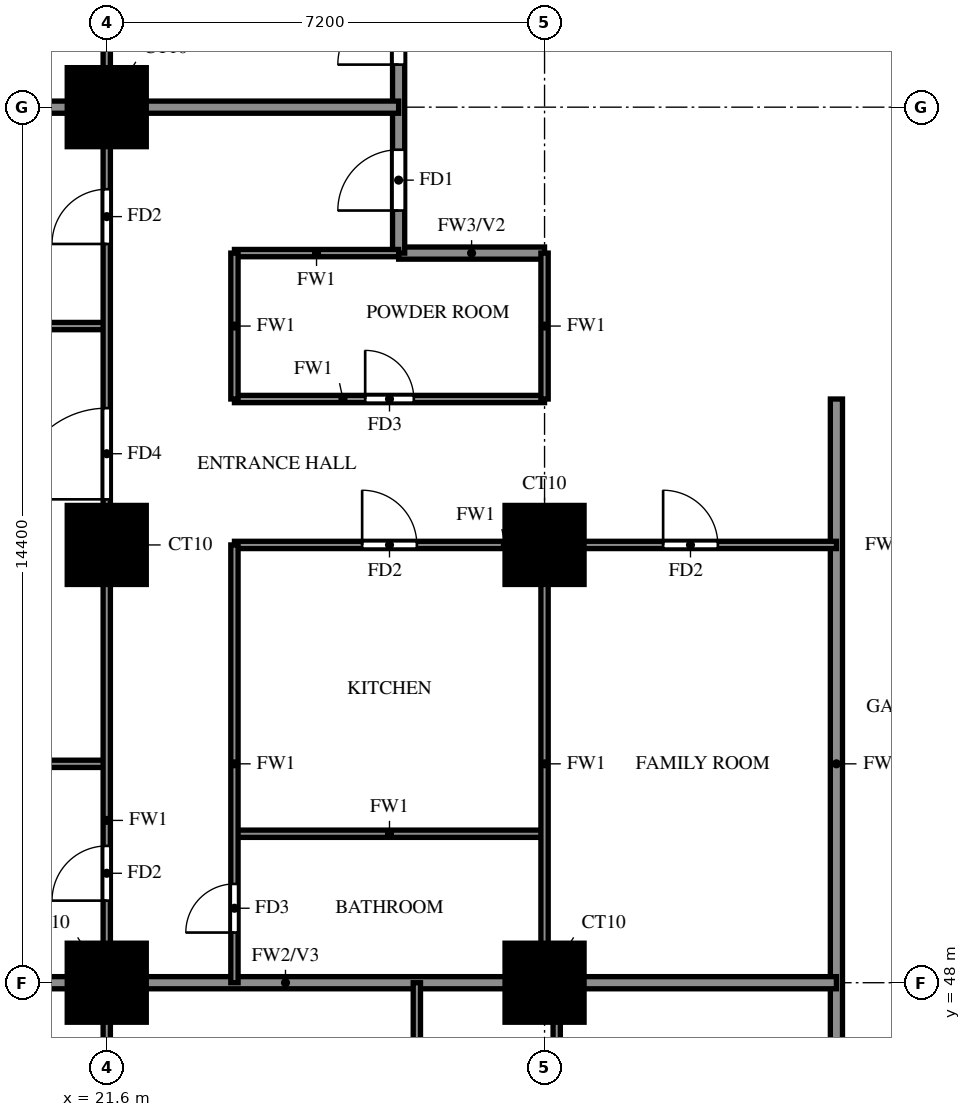
"""IFC4 building model, lengths in metres.
Left out: names, types, materials, properties, quantities, classifications, styles, units other than length and angle.
Written with IfcOpenShell. Run it as: python <this file> out.ifc"""

import sys

from ifc_helpers import new_model, si_unit, direction, frame, frame_2d, origin, origin_2d, place, context, subcontext, project, spatial, rectangle, extrude, source, transform, mapped, element, fill, save


model = new_model("IFC4")
c1 = context("Model", 3, precision=1e-05, world=origin(), true_north=direction((0.0, 1.0)))
c2 = subcontext(c1, "Body", "Model", "MODEL_VIEW")
j1 = project(units=[si_unit("LENGTHUNIT", "METRE"), si_unit("PLANEANGLEUNIT", "RADIAN")], contexts=[c1])
p1 = place(None, origin())
s1 = spatial("IfcSite", under=j1, at=p1, CompositionType="ELEMENT")
p2 = place(p1, origin())
s2 = spatial("IfcBuilding", under=s1, at=p2, CompositionType="ELEMENT")
p3 = place(p2, frame((0.0, 0.0, 86.5)))
s3 = spatial("IfcBuildingStorey", under=s2, at=p3, CompositionType="ELEMENT", Elevation=86.5)
m1 = source(origin(), c2, "Body", "SweptSolid", [
    extrude(rectangle(XDim=1.3, YDim=1.3, at=origin_2d()), origin(), (0.0, 0.0, 1.0), 3.18),
])
for number, where, z_axis, x_axis in (
    (1, (21.6, 48.0, 0.0), (0.0, 0.0, 1.0), (1.0, 0.0, 0.0)),
    (2, (28.8, 48.0, 0.0), (0.0, 0.0, 1.0), (1.0, 0.0, 0.0)),
    (3, (21.6, 55.2, 0.0), (0.0, 0.0, 1.0), (1.0, 0.0, 0.0)),
    (4, (28.8, 55.2, 0.0), (0.0, 0.0, 1.0), (1.0, 0.0, 0.0)),
    (5, (21.6, 62.4, 0.0), (0.0, 0.0, 1.0), (1.0, 0.0, 0.0)),
):
    element("IfcColumn", number, at=place(p3, frame(where, z_axis=z_axis, x_axis=x_axis)), inside=s3, PredefinedType="COLUMN", context=c2, shape_type="MappedRepresentation", body=[
        mapped(m1, transform((0.0, 0.0, 0.0))),
    ])
p4 = place(p3, frame((26.4, 60.0, 0.0), z_axis=(0.0, 0.0, 1.0), x_axis=(1.0, 0.0, 0.0)))
e6 = element("IfcWall", 6, at=p4, inside=s3, PredefinedType="SOLIDWALL", context=c2, shape_type="SweptSolid", body=[
    extrude(rectangle(XDim=2.4, YDim=0.2, at=frame_2d((1.2, 0.0))), origin(), (0.0, 0.0, 1.0), 3.18),
])
p5 = place(p3, frame((26.4, 60.0, 0.0), z_axis=(0.0, 0.0, 1.0), x_axis=(0.0, 1.0, 0.0)))
e7 = element("IfcWall", 7, at=p5, inside=s3, PredefinedType="SOLIDWALL", context=c2, shape_type="SweptSolid", body=[
    extrude(rectangle(XDim=9.45, YDim=0.2, at=frame_2d((4.725, 0.0))), origin(), (0.0, 0.0, 1.0), 3.18),
])
p6 = place(p5, frame((0.7, 0.0, 0.0)))
e8 = element("IfcOpeningElement", 8, at=p6, cuts=e7, PredefinedType="OPENING", context=c2, shape_type="SweptSolid", body=[
    extrude(rectangle(XDim=1.0, YDim=2.1, at=frame_2d((0.5, 1.05))), frame((0.0, 0.11, 0.0), z_axis=(0.0, -1.0, 0.0), x_axis=(1.0, 0.0, 0.0)), (0.0, 0.0, 1.0), 0.22),
])
p7 = place(p5, frame((3.1, 0.0, 0.0)))
e9 = element("IfcOpeningElement", 9, at=p7, cuts=e7, PredefinedType="OPENING", context=c2, shape_type="SweptSolid", body=[
    extrude(rectangle(XDim=1.0, YDim=2.1, at=frame_2d((0.5, 1.05))), frame((0.0, 0.11, 0.0), z_axis=(0.0, -1.0, 0.0), x_axis=(1.0, 0.0, 0.0)), (0.0, 0.0, 1.0), 0.22),
])
p8 = place(p3, frame((33.6, 45.6, 0.0), z_axis=(0.0, 0.0, 1.0), x_axis=(0.0, 1.0, 0.0)))
e10 = element("IfcWall", 10, at=p8, inside=s3, PredefinedType="SOLIDWALL", context=c2, shape_type="SweptSolid", body=[
    extrude(rectangle(XDim=12.0, YDim=0.2, at=frame_2d((6.0, 0.0))), origin(), (0.0, 0.0, 1.0), 3.18),
])
p9 = place(p3, frame((14.525, 48.0, 0.0), z_axis=(0.0, 0.0, 1.0), x_axis=(1.0, 0.0, 0.0)))
e11 = element("IfcWall", 11, at=p9, inside=s3, PredefinedType="SOLIDWALL", context=c2, shape_type="SweptSolid", body=[
    extrude(rectangle(XDim=19.075, YDim=0.2, at=frame_2d((9.538, 0.0))), origin(), (0.0, 0.0, 1.0), 3.18),
])
p10 = place(p3, frame((14.525, 62.4, 0.0), z_axis=(0.0, 0.0, 1.0), x_axis=(1.0, 0.0, 0.0)))
e12 = element("IfcWall", 12, at=p10, inside=s3, PredefinedType="SOLIDWALL", context=c2, shape_type="SweptSolid", body=[
    extrude(rectangle(XDim=11.875, YDim=0.2, at=frame_2d((5.938, 0.0))), origin(), (0.0, 0.0, 1.0), 3.18),
])
p11 = place(p3, frame((23.7, 50.45, 0.0), z_axis=(0.0, 0.0, 1.0), x_axis=(1.0, 0.0, 0.0)))
e13 = element("IfcWall", 13, at=p11, inside=s3, PredefinedType="PARTITIONING", context=c2, shape_type="SweptSolid", body=[
    extrude(rectangle(XDim=5.1, YDim=0.12, at=frame_2d((2.55, 0.0))), origin(), (0.0, 0.0, 1.0), 3.18),
])
p12 = place(p3, frame((14.525, 51.6, 0.0), z_axis=(0.0, 0.0, 1.0), x_axis=(1.0, 0.0, 0.0)))
e14 = element("IfcWall", 14, at=p12, inside=s3, PredefinedType="PARTITIONING", context=c2, shape_type="SweptSolid", body=[
    extrude(rectangle(XDim=7.075, YDim=0.12, at=frame_2d((3.538, 0.0))), origin(), (0.0, 0.0, 1.0), 2.28),
])
p13 = place(p3, frame((23.7, 55.2, 0.0), z_axis=(0.0, 0.0, 1.0), x_axis=(1.0, 0.0, 0.0)))
e15 = element("IfcWall", 15, at=p13, inside=s3, PredefinedType="PARTITIONING", context=c2, shape_type="SweptSolid", body=[
    extrude(rectangle(XDim=9.9, YDim=0.12, at=frame_2d((4.95, 0.0))), origin(), (0.0, 0.0, 1.0), 3.18),
])
p14 = place(p13, frame((2.1, 0.0, 0.0)))
e16 = element("IfcOpeningElement", 16, at=p14, cuts=e15, PredefinedType="OPENING", context=c2, shape_type="SweptSolid", body=[
    extrude(rectangle(XDim=0.9, YDim=2.1, at=frame_2d((0.45, 1.05))), frame((0.0, 0.07, 0.0), z_axis=(0.0, -1.0, 0.0), x_axis=(1.0, 0.0, 0.0)), (0.0, 0.0, 1.0), 0.14),
])
p15 = place(p13, frame((7.05, 0.0, 0.0)))
e17 = element("IfcOpeningElement", 17, at=p15, cuts=e15, PredefinedType="OPENING", context=c2, shape_type="SweptSolid", body=[
    extrude(rectangle(XDim=0.9, YDim=2.1, at=frame_2d((0.45, 1.05))), frame((0.0, 0.07, 0.0), z_axis=(0.0, -1.0, 0.0), x_axis=(1.0, 0.0, 0.0)), (0.0, 0.0, 1.0), 0.14),
])
p16 = place(p3, frame((23.7, 57.6, 0.0), z_axis=(0.0, 0.0, 1.0), x_axis=(1.0, 0.0, 0.0)))
e18 = element("IfcWall", 18, at=p16, inside=s3, PredefinedType="PARTITIONING", context=c2, shape_type="SweptSolid", body=[
    extrude(rectangle(XDim=5.1, YDim=0.12, at=frame_2d((2.55, 0.0))), origin(), (0.0, 0.0, 1.0), 3.18),
])
p17 = place(p16, frame((2.15, 0.0, 0.0)))
e19 = element("IfcOpeningElement", 19, at=p17, cuts=e18, PredefinedType="OPENING", context=c2, shape_type="SweptSolid", body=[
    extrude(rectangle(XDim=0.8, YDim=2.1, at=frame_2d((0.4, 1.05))), frame((0.0, 0.07, 0.0), z_axis=(0.0, -1.0, 0.0), x_axis=(1.0, 0.0, 0.0)), (0.0, 0.0, 1.0), 0.14),
])
p18 = place(p3, frame((14.525, 58.8, 0.0), z_axis=(0.0, 0.0, 1.0), x_axis=(1.0, 0.0, 0.0)))
e20 = element("IfcWall", 20, at=p18, inside=s3, PredefinedType="PARTITIONING", context=c2, shape_type="SweptSolid", body=[
    extrude(rectangle(XDim=7.075, YDim=0.12, at=frame_2d((3.538, 0.0))), origin(), (0.0, 0.0, 1.0), 2.28),
])
p19 = place(p3, frame((23.7, 60.0, 0.0), z_axis=(0.0, 0.0, 1.0), x_axis=(1.0, 0.0, 0.0)))
e21 = element("IfcWall", 21, at=p19, inside=s3, PredefinedType="PARTITIONING", context=c2, shape_type="SweptSolid", body=[
    extrude(rectangle(XDim=2.7, YDim=0.12, at=frame_2d((1.35, 0.0))), origin(), (0.0, 0.0, 1.0), 3.18),
])
p20 = place(p3, frame((21.6, 33.725, 0.0), z_axis=(0.0, 0.0, 1.0), x_axis=(0.0, 1.0, 0.0)))
e22 = element("IfcWall", 22, at=p20, inside=s3, PredefinedType="PARTITIONING", context=c2, shape_type="SweptSolid", body=[
    extrude(rectangle(XDim=32.275, YDim=0.12, at=frame_2d((16.137, 0.0))), origin(), (0.0, 0.0, 1.0), 3.18),
])
p21 = place(p20, frame((7.775, 0.0, 0.0)))
e23 = element("IfcOpeningElement", 23, at=p21, cuts=e22, PredefinedType="OPENING", context=c2, shape_type="SweptSolid", body=[
    extrude(rectangle(XDim=0.9, YDim=2.1, at=frame_2d((0.45, 1.05))), frame((0.0, 0.07, 0.0), z_axis=(0.0, -1.0, 0.0), x_axis=(1.0, 0.0, 0.0)), (0.0, 0.0, 1.0), 0.14),
])
p22 = place(p20, frame((15.625, 0.0, 0.0)))
e24 = element("IfcOpeningElement", 24, at=p22, cuts=e22, PredefinedType="OPENING", context=c2, shape_type="SweptSolid", body=[
    extrude(rectangle(XDim=0.9, YDim=2.1, at=frame_2d((0.45, 1.05))), frame((0.0, 0.07, 0.0), z_axis=(0.0, -1.0, 0.0), x_axis=(1.0, 0.0, 0.0)), (0.0, 0.0, 1.0), 0.14),
])
p23 = place(p20, frame((22.225, 0.0, 0.0)))
e25 = element("IfcOpeningElement", 25, at=p23, cuts=e22, PredefinedType="OPENING", context=c2, shape_type="SweptSolid", body=[
    extrude(rectangle(XDim=1.5, YDim=2.1, at=frame_2d((0.75, 1.05))), frame((0.0, 0.07, 0.0), z_axis=(0.0, -1.0, 0.0), x_axis=(1.0, 0.0, 0.0)), (0.0, 0.0, 1.0), 0.14),
])
p24 = place(p20, frame((26.425, 0.0, 0.0)))
e26 = element("IfcOpeningElement", 26, at=p24, cuts=e22, PredefinedType="OPENING", context=c2, shape_type="SweptSolid", body=[
    extrude(rectangle(XDim=0.9, YDim=2.1, at=frame_2d((0.45, 1.05))), frame((0.0, 0.07, 0.0), z_axis=(0.0, -1.0, 0.0), x_axis=(1.0, 0.0, 0.0)), (0.0, 0.0, 1.0), 0.14),
])
p25 = place(p20, frame((30.025, 0.0, 0.0)))
e27 = element("IfcOpeningElement", 27, at=p25, cuts=e22, PredefinedType="OPENING", context=c2, shape_type="SweptSolid", body=[
    extrude(rectangle(XDim=0.9, YDim=2.1, at=frame_2d((0.45, 1.05))), frame((0.0, 0.07, 0.0), z_axis=(0.0, -1.0, 0.0), x_axis=(1.0, 0.0, 0.0)), (0.0, 0.0, 1.0), 0.14),
])
p26 = place(p3, frame((23.7, 48.0, 0.0), z_axis=(0.0, 0.0, 1.0), x_axis=(0.0, 1.0, 0.0)))
e28 = element("IfcWall", 28, at=p26, inside=s3, PredefinedType="PARTITIONING", context=c2, shape_type="SweptSolid", body=[
    extrude(rectangle(XDim=7.2, YDim=0.12, at=frame_2d((3.6, 0.0))), origin(), (0.0, 0.0, 1.0), 3.18),
])
p27 = place(p26, frame((0.825, 0.0, 0.0)))
e29 = element("IfcOpeningElement", 29, at=p27, cuts=e28, PredefinedType="OPENING", context=c2, shape_type="SweptSolid", body=[
    extrude(rectangle(XDim=0.8, YDim=2.1, at=frame_2d((0.4, 1.05))), frame((0.0, 0.07, 0.0), z_axis=(0.0, -1.0, 0.0), x_axis=(1.0, 0.0, 0.0)), (0.0, 0.0, 1.0), 0.14),
])
p28 = place(p3, frame((23.7, 57.6, 0.0), z_axis=(0.0, 0.0, 1.0), x_axis=(0.0, 1.0, 0.0)))
e30 = element("IfcWall", 30, at=p28, inside=s3, PredefinedType="PARTITIONING", context=c2, shape_type="SweptSolid", body=[
    extrude(rectangle(XDim=2.4, YDim=0.12, at=frame_2d((1.2, 0.0))), origin(), (0.0, 0.0, 1.0), 3.18),
])
p29 = place(p3, frame((26.7, 42.9, 0.0), z_axis=(0.0, 0.0, 1.0), x_axis=(0.0, 1.0, 0.0)))
e31 = element("IfcWall", 31, at=p29, inside=s3, PredefinedType="PARTITIONING", context=c2, shape_type="SweptSolid", body=[
    extrude(rectangle(XDim=5.1, YDim=0.12, at=frame_2d((2.55, 0.0))), origin(), (0.0, 0.0, 1.0), 3.18),
])
p30 = place(p3, frame((28.8, 48.0, 0.0), z_axis=(0.0, 0.0, 1.0), x_axis=(0.0, 1.0, 0.0)))
e32 = element("IfcWall", 32, at=p30, inside=s3, PredefinedType="PARTITIONING", context=c2, shape_type="SweptSolid", body=[
    extrude(rectangle(XDim=7.2, YDim=0.12, at=frame_2d((3.6, 0.0))), origin(), (0.0, 0.0, 1.0), 3.18),
])
p31 = place(p3, frame((28.8, 57.6, 0.0), z_axis=(0.0, 0.0, 1.0), x_axis=(0.0, 1.0, 0.0)))
e33 = element("IfcWall", 33, at=p31, inside=s3, PredefinedType="PARTITIONING", context=c2, shape_type="SweptSolid", body=[
    extrude(rectangle(XDim=2.4, YDim=0.12, at=frame_2d((1.2, 0.0))), origin(), (0.0, 0.0, 1.0), 3.18),
])
p32 = place(p3, frame((29.0, 42.9, 0.0), z_axis=(0.0, 0.0, 1.0), x_axis=(0.0, 1.0, 0.0)))
e34 = element("IfcWall", 34, at=p32, inside=s3, PredefinedType="PARTITIONING", context=c2, shape_type="SweptSolid", body=[
    extrude(rectangle(XDim=5.1, YDim=0.12, at=frame_2d((2.55, 0.0))), origin(), (0.0, 0.0, 1.0), 3.18),
])
p33 = place(p6, origin())
e35 = element("IfcDoor", 35, at=p33, inside=s3, OperationType="SINGLE_SWING_LEFT", PredefinedType="DOOR", context=c2, shape_type="SweptSolid", body=[
    extrude(rectangle(XDim=1.0, YDim=2.1, at=frame_2d((0.5, 1.05))), frame((0.0, 0.025, 0.0), z_axis=(0.0, -1.0, 0.0), x_axis=(1.0, 0.0, 0.0)), (0.0, 0.0, 1.0), 0.05),
])
fill(e8, e35)
p34 = place(p22, origin())
e36 = element("IfcDoor", 36, at=p34, inside=s3, OperationType="SINGLE_SWING_LEFT", PredefinedType="DOOR", context=c2, shape_type="SweptSolid", body=[
    extrude(rectangle(XDim=0.9, YDim=2.1, at=frame_2d((0.45, 1.05))), frame((0.0, 0.025, 0.0), z_axis=(0.0, -1.0, 0.0), x_axis=(1.0, 0.0, 0.0)), (0.0, 0.0, 1.0), 0.05),
])
fill(e24, e36)
p35 = place(p23, origin())
e37 = element("IfcDoor", 37, at=p35, inside=s3, OperationType="SINGLE_SWING_LEFT", PredefinedType="DOOR", context=c2, shape_type="SweptSolid", body=[
    extrude(rectangle(XDim=1.5, YDim=2.1, at=frame_2d((0.75, 1.05))), frame((0.0, 0.025, 0.0), z_axis=(0.0, -1.0, 0.0), x_axis=(1.0, 0.0, 0.0)), (0.0, 0.0, 1.0), 0.05),
])
fill(e25, e37)
p36 = place(p24, origin())
e38 = element("IfcDoor", 38, at=p36, inside=s3, OperationType="SINGLE_SWING_LEFT", PredefinedType="DOOR", context=c2, shape_type="SweptSolid", body=[
    extrude(rectangle(XDim=0.9, YDim=2.1, at=frame_2d((0.45, 1.05))), frame((0.0, 0.025, 0.0), z_axis=(0.0, -1.0, 0.0), x_axis=(1.0, 0.0, 0.0)), (0.0, 0.0, 1.0), 0.05),
])
fill(e26, e38)
p37 = place(p27, origin())
e39 = element("IfcDoor", 39, at=p37, inside=s3, OperationType="SINGLE_SWING_LEFT", PredefinedType="DOOR", context=c2, shape_type="SweptSolid", body=[
    extrude(rectangle(XDim=0.8, YDim=2.1, at=frame_2d((0.4, 1.05))), frame((0.0, 0.025, 0.0), z_axis=(0.0, -1.0, 0.0), x_axis=(1.0, 0.0, 0.0)), (0.0, 0.0, 1.0), 0.05),
])
fill(e29, e39)
p38 = place(p14, origin())
e40 = element("IfcDoor", 40, at=p38, inside=s3, OperationType="SINGLE_SWING_RIGHT", PredefinedType="DOOR", context=c2, shape_type="SweptSolid", body=[
    extrude(rectangle(XDim=0.9, YDim=2.1, at=frame_2d((0.45, 1.05))), frame((0.0, 0.025, 0.0), z_axis=(0.0, -1.0, 0.0), x_axis=(1.0, 0.0, 0.0)), (0.0, 0.0, 1.0), 0.05),
])
fill(e16, e40)
p39 = place(p17, origin())
e41 = element("IfcDoor", 41, at=p39, inside=s3, OperationType="SINGLE_SWING_LEFT", PredefinedType="DOOR", context=c2, shape_type="SweptSolid", body=[
    extrude(rectangle(XDim=0.8, YDim=2.1, at=frame_2d((0.4, 1.05))), frame((0.0, 0.025, 0.0), z_axis=(0.0, -1.0, 0.0), x_axis=(1.0, 0.0, 0.0)), (0.0, 0.0, 1.0), 0.05),
])
fill(e19, e41)
p40 = place(p15, origin())
e42 = element("IfcDoor", 42, at=p40, inside=s3, OperationType="SINGLE_SWING_LEFT", PredefinedType="DOOR", context=c2, shape_type="SweptSolid", body=[
    extrude(rectangle(XDim=0.9, YDim=2.1, at=frame_2d((0.45, 1.05))), frame((0.0, 0.025, 0.0), z_axis=(0.0, -1.0, 0.0), x_axis=(1.0, 0.0, 0.0)), (0.0, 0.0, 1.0), 0.05),
])
fill(e17, e42)
p41 = place(p7, origin())
e43 = element("IfcDoor", 43, at=p41, inside=s3, OperationType="SINGLE_SWING_RIGHT", PredefinedType="DOOR", context=c2, shape_type="SweptSolid", body=[
    extrude(rectangle(XDim=1.0, YDim=2.1, at=frame_2d((0.5, 1.05))), frame((0.0, 0.025, 0.0), z_axis=(0.0, -1.0, 0.0), x_axis=(1.0, 0.0, 0.0)), (0.0, 0.0, 1.0), 0.05),
])
fill(e9, e43)
save(model, sys.argv[1])
